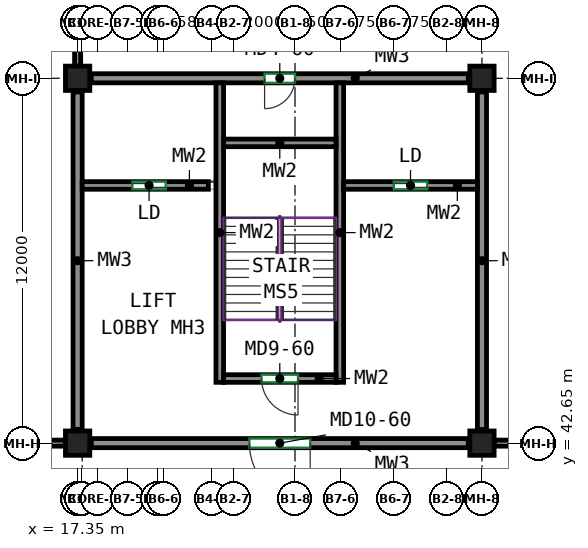
"""IFC4 building model, lengths in metres.
Left out: names, types, materials, properties, quantities, classifications, styles, units other than length and angle.
Written with IfcOpenShell. Run it as: python <this file> out.ifc"""

import sys

from ifc_helpers import new_model, si_unit, direction, frame, frame_2d, origin, origin_2d, place, context, subcontext, project, spatial, rectangle, extrude, source, transform, mapped, element, fill, save


model = new_model("IFC4")
c1 = context("Model", 3, precision=1e-05, world=origin(), true_north=direction((0.0, 1.0)))
c2 = subcontext(c1, "Body", "Model", "MODEL_VIEW")
j1 = project(units=[si_unit("LENGTHUNIT", "METRE"), si_unit("PLANEANGLEUNIT", "RADIAN")], contexts=[c1])
p1 = place(None, origin())
s1 = spatial("IfcSite", under=j1, at=p1, CompositionType="ELEMENT")
p2 = place(p1, origin())
s2 = spatial("IfcBuilding", under=s1, at=p2, CompositionType="ELEMENT")
p3 = place(p2, frame((0.0, 0.0, 13.5)))
s3 = spatial("IfcBuildingStorey", under=s2, at=p3, CompositionType="ELEMENT", Elevation=13.5)
m1 = source(origin(), c2, "Body", "SweptSolid", [
    extrude(rectangle(XDim=0.8, YDim=0.8, at=origin_2d()), origin(), (0.0, 0.0, 1.0), 4.1),
])
for number, where, z_axis, x_axis in (
    (1, (17.35, 42.65, 0.0), (0.0, 0.0, 1.0), (1.0, 0.0, 0.0)),
    (2, (17.35, 54.65, 0.0), (0.0, 0.0, 1.0), (1.0, 0.0, 0.0)),
    (3, (30.65, 42.65, 0.0), (0.0, 0.0, 1.0), (1.0, 0.0, 0.0)),
    (4, (30.65, 54.65, 0.0), (0.0, 0.0, 1.0), (1.0, 0.0, 0.0)),
):
    element("IfcColumn", number, at=place(p3, frame(where, z_axis=z_axis, x_axis=x_axis)), inside=s3, PredefinedType="COLUMN", context=c2, shape_type="MappedRepresentation", body=[
        mapped(m1, transform((0.0, 0.0, 0.0))),
    ])
m2 = source(origin(), c2, "Body", "SweptSolid", [
    extrude(rectangle(XDim=12.4, YDim=0.3, at=frame_2d((6.2, 0.0))), origin(), (0.0, 0.0, 1.0), 3.3),
])
p4 = place(p3, frame((30.2, 54.65, 0.0), z_axis=(0.0, 0.0, 1.0), x_axis=(-1.0, 0.0, 0.0)))
e5 = element("IfcWall", 5, at=p4, inside=s3, PredefinedType="SHEAR", context=c2, shape_type="MappedRepresentation", body=[
    mapped(m2, transform((0.0, 0.0, 0.0))),
])
p5 = place(p4, frame((5.7, 0.0, 0.0)))
e6 = element("IfcOpeningElement", 6, at=p5, cuts=e5, PredefinedType="OPENING", context=c2, shape_type="SweptSolid", body=[
    extrude(rectangle(XDim=1.0, YDim=2.1, at=frame_2d((0.5, 1.05))), frame((0.0, 0.16, 0.0), z_axis=(0.0, -1.0, 0.0), x_axis=(1.0, 0.0, 0.0)), (0.0, 0.0, 1.0), 0.32),
])
p6 = place(p3, frame((30.2, 42.65, 0.0), z_axis=(0.0, 0.0, 1.0), x_axis=(-1.0, 0.0, 0.0)))
e7 = element("IfcWall", 7, at=p6, inside=s3, PredefinedType="SHEAR", context=c2, shape_type="MappedRepresentation", body=[
    mapped(m2, transform((0.0, 0.0, 0.0))),
])
p7 = place(p6, frame((5.2, 0.0, 0.0)))
e8 = element("IfcOpeningElement", 8, at=p7, cuts=e7, PredefinedType="OPENING", context=c2, shape_type="SweptSolid", body=[
    extrude(rectangle(XDim=2.0, YDim=2.4, at=frame_2d((1.0, 1.2))), frame((0.0, 0.16, 0.0), z_axis=(0.0, -1.0, 0.0), x_axis=(1.0, 0.0, 0.0)), (0.0, 0.0, 1.0), 0.32),
])
m3 = source(origin(), c2, "Body", "SweptSolid", [
    extrude(rectangle(XDim=11.1, YDim=0.3, at=frame_2d((5.55, 0.0))), origin(), (0.0, 0.0, 1.0), 3.3),
])
for number, where, z_axis, x_axis in (
    (9, (30.65, 54.2, 0.0), (0.0, 0.0, 1.0), (0.0, -1.0, 0.0)),
    (10, (17.35, 54.2, 0.0), (0.0, 0.0, 1.0), (0.0, -1.0, 0.0)),
):
    element("IfcWall", number, at=place(p3, frame(where, z_axis=z_axis, x_axis=x_axis)), inside=s3, PredefinedType="SHEAR", context=c2, shape_type="MappedRepresentation", body=[
        mapped(m3, transform((0.0, 0.0, 0.0))),
    ])
m4 = source(origin(), c2, "Body", "SweptSolid", [
    extrude(rectangle(XDim=9.85, YDim=0.25, at=frame_2d((4.925, 0.0))), origin(), (0.0, 0.0, 1.0), 4.1),
])
for number, where, z_axis, x_axis in (
    (11, (25.975, 54.5, 0.0), (0.0, 0.0, 1.0), (0.0, -1.0, 0.0)),
    (12, (22.025, 54.5, 0.0), (0.0, 0.0, 1.0), (0.0, -1.0, 0.0)),
):
    element("IfcWall", number, at=place(p3, frame(where, z_axis=z_axis, x_axis=x_axis)), inside=s3, PredefinedType="SHEAR", context=c2, shape_type="MappedRepresentation", body=[
        mapped(m4, transform((0.0, 0.0, 0.0))),
    ])
m5 = source(origin(), c2, "Body", "SweptSolid", [
    extrude(rectangle(XDim=3.7, YDim=0.25, at=frame_2d((1.85, 0.0))), origin(), (0.0, 0.0, 1.0), 4.1),
])
p8 = place(p3, frame((25.85, 52.525, 0.0), z_axis=(0.0, 0.0, 1.0), x_axis=(-1.0, 0.0, 0.0)))
e13 = element("IfcWall", 13, at=p8, inside=s3, PredefinedType="SHEAR", context=c2, shape_type="MappedRepresentation", body=[
    mapped(m5, transform((0.0, 0.0, 0.0))),
])
p9 = place(p3, frame((25.85, 44.775, 0.0), z_axis=(0.0, 0.0, 1.0), x_axis=(-1.0, 0.0, 0.0)))
e14 = element("IfcWall", 14, at=p9, inside=s3, PredefinedType="SHEAR", context=c2, shape_type="MappedRepresentation", body=[
    mapped(m5, transform((0.0, 0.0, 0.0))),
])
p10 = place(p9, frame((1.25, 0.0, 0.0)))
e15 = element("IfcOpeningElement", 15, at=p10, cuts=e14, PredefinedType="OPENING", context=c2, shape_type="SweptSolid", body=[
    extrude(rectangle(XDim=1.2, YDim=2.1, at=frame_2d((0.6, 1.05))), frame((0.0, 0.135, 0.0), z_axis=(0.0, -1.0, 0.0), x_axis=(1.0, 0.0, 0.0)), (0.0, 0.0, 1.0), 0.27),
])
m6 = source(origin(), c2, "Body", "SweptSolid", [
    extrude(rectangle(XDim=4.4, YDim=0.25, at=frame_2d((2.2, 0.0))), origin(), (0.0, 0.0, 1.0), 4.1),
])
p11 = place(p3, frame((30.5, 51.125, 0.0), z_axis=(0.0, 0.0, 1.0), x_axis=(-1.0, 0.0, 0.0)))
e16 = element("IfcWall", 16, at=p11, inside=s3, PredefinedType="SHEAR", context=c2, shape_type="MappedRepresentation", body=[
    mapped(m6, transform((0.0, 0.0, 0.0))),
])
p12 = place(p11, frame((1.65, 0.0, 0.0)))
e17 = element("IfcOpeningElement", 17, at=p12, cuts=e16, PredefinedType="OPENING", context=c2, shape_type="SweptSolid", body=[
    extrude(rectangle(XDim=1.1, YDim=2.1, at=frame_2d((0.55, 1.05))), frame((0.0, 0.135, 0.0), z_axis=(0.0, -1.0, 0.0), x_axis=(1.0, 0.0, 0.0)), (0.0, 0.0, 1.0), 0.27),
])
m7 = source(origin(), c2, "Body", "SweptSolid", [
    extrude(rectangle(XDim=4.15, YDim=0.25, at=frame_2d((2.075, 0.0))), origin(), (0.0, 0.0, 1.0), 4.1),
])
p13 = place(p3, frame((21.65, 51.125, 0.0), z_axis=(0.0, 0.0, 1.0), x_axis=(-1.0, 0.0, 0.0)))
e18 = element("IfcWall", 18, at=p13, inside=s3, PredefinedType="SHEAR", context=c2, shape_type="MappedRepresentation", body=[
    mapped(m7, transform((0.0, 0.0, 0.0))),
])
p14 = place(p13, frame((1.4, 0.0, 0.0)))
e19 = element("IfcOpeningElement", 19, at=p14, cuts=e18, PredefinedType="OPENING", context=c2, shape_type="SweptSolid", body=[
    extrude(rectangle(XDim=1.1, YDim=2.1, at=frame_2d((0.55, 1.05))), frame((0.0, 0.135, 0.0), z_axis=(0.0, -1.0, 0.0), x_axis=(1.0, 0.0, 0.0)), (0.0, 0.0, 1.0), 0.27),
])
m8 = source(origin(), c2, "Body", "SweptSolid", [
    extrude(rectangle(XDim=11.2, YDim=0.2, at=frame_2d((5.6, 0.0))), origin(), (0.0, 0.0, 1.0), 3.3),
])
p15 = place(p3, frame((5.75, 42.65, 0.0), z_axis=(0.0, 0.0, 1.0), x_axis=(1.0, 0.0, 0.0)))
e20 = element("IfcWall", 20, at=p15, inside=s3, PredefinedType="PARTITIONING", context=c2, shape_type="MappedRepresentation", body=[
    mapped(m8, transform((0.0, 0.0, 0.0))),
])
p16 = place(p15, frame((4.4, 0.0, 0.0)))
e21 = element("IfcOpeningElement", 21, at=p16, cuts=e20, PredefinedType="OPENING", context=c2, shape_type="SweptSolid", body=[
    extrude(rectangle(XDim=2.4, YDim=2.4, at=frame_2d((1.2, 1.2))), frame((0.0, 0.11, 0.0), z_axis=(0.0, -1.0, 0.0), x_axis=(1.0, 0.0, 0.0)), (0.0, 0.0, 1.0), 0.22),
])
m9 = source(origin(), c2, "Body", "SweptSolid", [
    extrude(rectangle(XDim=1.8, YDim=0.2, at=frame_2d((0.9, 0.0))), origin(), (0.0, 0.0, 1.0), 4.1),
])
p17 = place(p3, frame((17.35, 56.85, 0.0), z_axis=(0.0, 0.0, 1.0), x_axis=(0.0, -1.0, 0.0)))
e22 = element("IfcWall", 22, at=p17, inside=s3, PredefinedType="PARTITIONING", context=c2, shape_type="MappedRepresentation", body=[
    mapped(m9, transform((0.0, 0.0, 0.0))),
])
p18 = place(p3, frame((31.05, 42.65, 0.0), z_axis=(0.0, 0.0, 1.0), x_axis=(1.0, 0.0, 0.0)))
e23 = element("IfcWall", 23, at=p18, inside=s3, PredefinedType="PARTITIONING", context=c2, shape_type="MappedRepresentation", body=[
    mapped(m8, transform((0.0, 0.0, 0.0))),
])
p19 = place(p18, frame((5.1, 0.0, 0.0)))
e24 = element("IfcOpeningElement", 24, at=p19, cuts=e23, PredefinedType="OPENING", context=c2, shape_type="SweptSolid", body=[
    extrude(rectangle(XDim=1.0, YDim=2.1, at=frame_2d((0.5, 1.05))), frame((0.0, 0.11, 0.0), z_axis=(0.0, -1.0, 0.0), x_axis=(1.0, 0.0, 0.0)), (0.0, 0.0, 1.0), 0.22),
])
p20 = place(p10, origin())
e25 = element("IfcDoor", 25, at=p20, inside=s3, OperationType="DOUBLE_DOOR_SINGLE_SWING", PredefinedType="DOOR", context=c2, shape_type="SweptSolid", body=[
    extrude(rectangle(XDim=1.2, YDim=2.1, at=frame_2d((0.6, 1.05))), frame((0.0, 0.025, 0.0), z_axis=(0.0, -1.0, 0.0), x_axis=(1.0, 0.0, 0.0)), (0.0, 0.0, 1.0), 0.05),
])
fill(e15, e25)
p21 = place(p7, origin())
e26 = element("IfcDoor", 26, at=p21, inside=s3, OperationType="DOUBLE_DOOR_SINGLE_SWING", PredefinedType="DOOR", context=c2, shape_type="SweptSolid", body=[
    extrude(rectangle(XDim=2.0, YDim=2.4, at=frame_2d((1.0, 1.2))), frame((0.0, 0.025, 0.0), z_axis=(0.0, -1.0, 0.0), x_axis=(1.0, 0.0, 0.0)), (0.0, 0.0, 1.0), 0.05),
])
fill(e8, e26)
p22 = place(p12, origin())
e27 = element("IfcDoor", 27, at=p22, inside=s3, OperationType="SLIDING_TO_LEFT", PredefinedType="DOOR", context=c2, shape_type="SweptSolid", body=[
    extrude(rectangle(XDim=1.1, YDim=2.1, at=frame_2d((0.55, 1.05))), frame((0.0, 0.025, 0.0), z_axis=(0.0, -1.0, 0.0), x_axis=(1.0, 0.0, 0.0)), (0.0, 0.0, 1.0), 0.05),
])
fill(e17, e27)
p23 = place(p14, origin())
e28 = element("IfcDoor", 28, at=p23, inside=s3, OperationType="SLIDING_TO_LEFT", PredefinedType="DOOR", context=c2, shape_type="SweptSolid", body=[
    extrude(rectangle(XDim=1.1, YDim=2.1, at=frame_2d((0.55, 1.05))), frame((0.0, 0.025, 0.0), z_axis=(0.0, -1.0, 0.0), x_axis=(1.0, 0.0, 0.0)), (0.0, 0.0, 1.0), 0.05),
])
fill(e19, e28)
p24 = place(p5, origin())
e29 = element("IfcDoor", 29, at=p24, inside=s3, OperationType="SINGLE_SWING_RIGHT", PredefinedType="DOOR", context=c2, shape_type="SweptSolid", body=[
    extrude(rectangle(XDim=1.0, YDim=2.1, at=frame_2d((0.5, 1.05))), frame((0.0, 0.025, 0.0), z_axis=(0.0, -1.0, 0.0), x_axis=(1.0, 0.0, 0.0)), (0.0, 0.0, 1.0), 0.05),
])
fill(e6, e29)
save(model, sys.argv[1])
